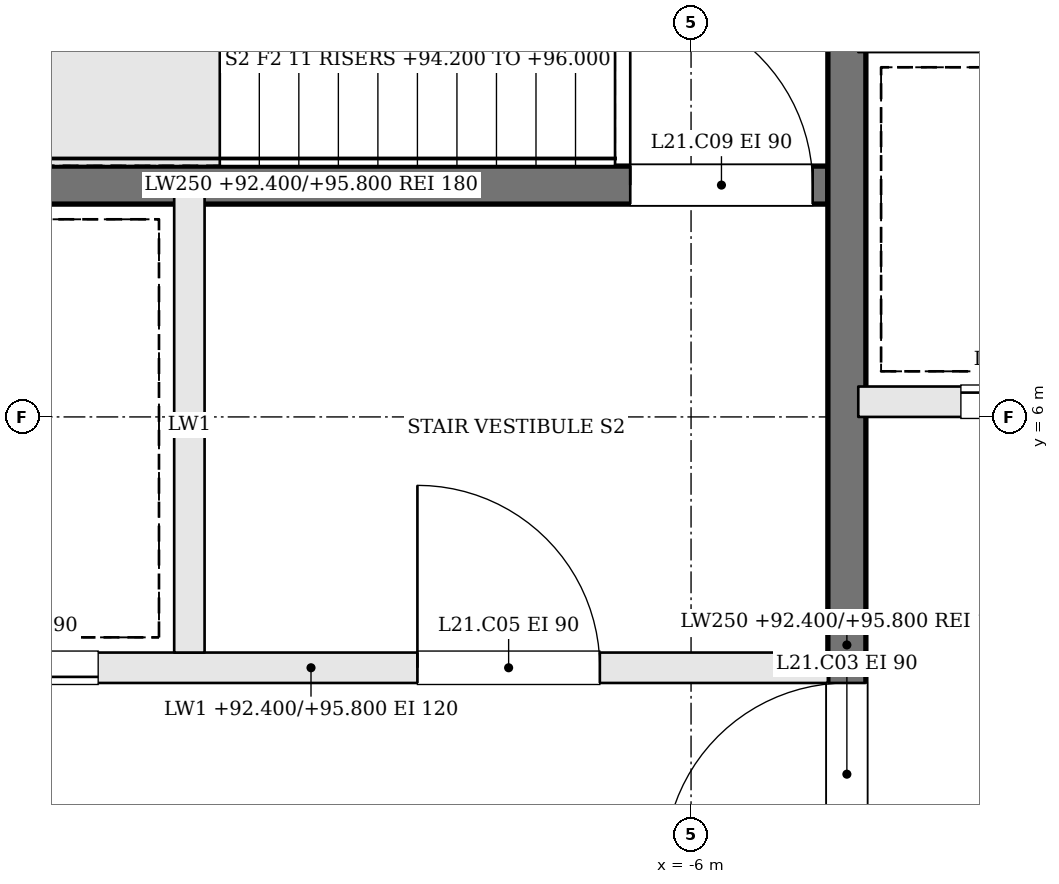
"""IFC4 building model, lengths in metres.
Left out: names, types, materials, properties, quantities, classifications, styles, units other than length and angle.
Written with IfcOpenShell. Run it as: python <this file> out.ifc"""

import sys

from ifc_helpers import new_model, si_unit, direction, frame, frame_2d, origin, place, context, subcontext, project, spatial, rectangle, extrude, element, fill, save


model = new_model("IFC4")
c1 = context("Model", 3, precision=1e-05, world=origin(), true_north=direction((0.0, 1.0)))
c2 = subcontext(c1, "Body", "Model", "MODEL_VIEW")
j1 = project(units=[si_unit("LENGTHUNIT", "METRE"), si_unit("PLANEANGLEUNIT", "RADIAN")], contexts=[c1])
p1 = place(None, origin())
s1 = spatial("IfcSite", under=j1, at=p1, CompositionType="ELEMENT")
p2 = place(p1, origin())
s2 = spatial("IfcBuilding", under=s1, at=p2, CompositionType="ELEMENT")
p3 = place(p2, frame((0.0, 0.0, 92.4)))
s3 = spatial("IfcBuildingStorey", under=s2, at=p3, CompositionType="ELEMENT", Elevation=92.4)
p4 = place(p3, frame((-11.9, 4.35, 0.0), z_axis=(0.0, 0.0, 1.0), x_axis=(1.0, 0.0, 0.0)))
e1 = element("IfcWall", 1, at=p4, inside=s3, PredefinedType="SOLIDWALL", context=c2, shape_type="SweptSolid", body=[
    extrude(rectangle(XDim=6.8, YDim=0.2, at=frame_2d((3.4, 0.0))), origin(), (0.0, 0.0, 1.0), 3.4),
])
p5 = place(p4, frame((4.1, 0.0, 0.0)))
e2 = element("IfcOpeningElement", 2, at=p5, cuts=e1, PredefinedType="OPENING", context=c2, shape_type="SweptSolid", body=[
    extrude(rectangle(XDim=1.2, YDim=2.1, at=frame_2d((0.6, 1.05))), frame((0.0, 0.11, 0.0), z_axis=(0.0, -1.0, 0.0), x_axis=(1.0, 0.0, 0.0)), (0.0, 0.0, 1.0), 0.22),
])
p6 = place(p4, frame((0.8, 0.0, 0.0)))
e3 = element("IfcOpeningElement", 3, at=p6, cuts=e1, PredefinedType="OPENING", context=c2, shape_type="SweptSolid", body=[
    extrude(rectangle(XDim=1.2, YDim=2.1, at=frame_2d((0.6, 1.05))), frame((0.0, 0.11, 0.0), z_axis=(0.0, -1.0, 0.0), x_axis=(1.0, 0.0, 0.0)), (0.0, 0.0, 1.0), 0.22),
])
p7 = place(p3, frame((-11.9, 7.525, 0.0), z_axis=(0.0, 0.0, 1.0), x_axis=(1.0, 0.0, 0.0)))
e4 = element("IfcWall", 4, at=p7, inside=s3, PredefinedType="SOLIDWALL", context=c2, shape_type="SweptSolid", body=[
    extrude(rectangle(XDim=6.8, YDim=0.25, at=frame_2d((3.4, 0.0))), origin(), (0.0, 0.0, 1.0), 3.4),
])
p8 = place(p7, frame((5.5, 0.0, 0.0)))
e5 = element("IfcOpeningElement", 5, at=p8, cuts=e4, PredefinedType="OPENING", context=c2, shape_type="SweptSolid", body=[
    extrude(rectangle(XDim=1.2, YDim=2.1, at=frame_2d((0.6, 1.05))), frame((0.0, 0.135, 0.0), z_axis=(0.0, -1.0, 0.0), x_axis=(1.0, 0.0, 0.0)), (0.0, 0.0, 1.0), 0.27),
])
p9 = place(p3, frame((-9.3, 4.45, 0.0), z_axis=(0.0, 0.0, 1.0), x_axis=(0.0, 1.0, 0.0)))
e6 = element("IfcWall", 6, at=p9, inside=s3, PredefinedType="SOLIDWALL", context=c2, shape_type="SweptSolid", body=[
    extrude(rectangle(XDim=3.0, YDim=0.2, at=frame_2d((1.5, 0.0))), origin(), (0.0, 0.0, 1.0), 3.4),
])
p10 = place(p3, frame((-4.975, -1.9, 0.0), z_axis=(0.0, 0.0, 1.0), x_axis=(0.0, 1.0, 0.0)))
e7 = element("IfcWall", 7, at=p10, inside=s3, PredefinedType="SOLIDWALL", context=c2, shape_type="SweptSolid", body=[
    extrude(rectangle(XDim=12.8, YDim=0.25, at=frame_2d((6.4, 0.0))), origin(), (0.0, 0.0, 1.0), 3.4),
])
p11 = place(p10, frame((4.95, 0.0, 0.0)))
e8 = element("IfcOpeningElement", 8, at=p11, cuts=e7, PredefinedType="OPENING", context=c2, shape_type="SweptSolid", body=[
    extrude(rectangle(XDim=1.2, YDim=2.1, at=frame_2d((0.6, 1.05))), frame((0.0, 0.135, 0.0), z_axis=(0.0, -1.0, 0.0), x_axis=(1.0, 0.0, 0.0)), (0.0, 0.0, 1.0), 0.27),
])
p12 = place(p3, frame((-4.9, 6.1, 0.0), z_axis=(0.0, 0.0, 1.0), x_axis=(1.0, 0.0, 0.0)))
e9 = element("IfcWall", 9, at=p12, inside=s3, PredefinedType="SOLIDWALL", context=c2, shape_type="SweptSolid", body=[
    extrude(rectangle(XDim=9.8, YDim=0.2, at=frame_2d((4.9, 0.0))), origin(), (0.0, 0.0, 1.0), 3.4),
])
p13 = place(p12, frame((0.675, 0.0, 0.0)))
e10 = element("IfcOpeningElement", 10, at=p13, cuts=e9, PredefinedType="OPENING", context=c2, shape_type="SweptSolid", body=[
    extrude(rectangle(XDim=1.1, YDim=2.1, at=frame_2d((0.55, 1.05))), frame((0.0, 0.11, 0.0), z_axis=(0.0, -1.0, 0.0), x_axis=(1.0, 0.0, 0.0)), (0.0, 0.0, 1.0), 0.22),
])
p14 = place(p12, frame((3.125, 0.0, 0.0)))
e11 = element("IfcOpeningElement", 11, at=p14, cuts=e9, PredefinedType="OPENING", context=c2, shape_type="SweptSolid", body=[
    extrude(rectangle(XDim=1.1, YDim=2.1, at=frame_2d((0.55, 1.05))), frame((0.0, 0.11, 0.0), z_axis=(0.0, -1.0, 0.0), x_axis=(1.0, 0.0, 0.0)), (0.0, 0.0, 1.0), 0.22),
])
p15 = place(p12, frame((5.575, 0.0, 0.0)))
e12 = element("IfcOpeningElement", 12, at=p15, cuts=e9, PredefinedType="OPENING", context=c2, shape_type="SweptSolid", body=[
    extrude(rectangle(XDim=1.1, YDim=2.1, at=frame_2d((0.55, 1.05))), frame((0.0, 0.11, 0.0), z_axis=(0.0, -1.0, 0.0), x_axis=(1.0, 0.0, 0.0)), (0.0, 0.0, 1.0), 0.22),
])
p16 = place(p12, frame((8.025, 0.0, 0.0)))
e13 = element("IfcOpeningElement", 13, at=p16, cuts=e9, PredefinedType="OPENING", context=c2, shape_type="SweptSolid", body=[
    extrude(rectangle(XDim=1.1, YDim=2.1, at=frame_2d((0.55, 1.05))), frame((0.0, 0.11, 0.0), z_axis=(0.0, -1.0, 0.0), x_axis=(1.0, 0.0, 0.0)), (0.0, 0.0, 1.0), 0.22),
])
p17 = place(p11, origin())
e14 = element("IfcDoor", 14, at=p17, inside=s3, OperationType="SINGLE_SWING_LEFT", PredefinedType="DOOR", context=c2, shape_type="SweptSolid", body=[
    extrude(rectangle(XDim=1.2, YDim=2.1, at=frame_2d((0.6, 1.05))), frame((0.0, 0.025, 0.0), z_axis=(0.0, -1.0, 0.0), x_axis=(1.0, 0.0, 0.0)), (0.0, 0.0, 1.0), 0.05),
])
fill(e8, e14)
p18 = place(p5, origin())
e15 = element("IfcDoor", 15, at=p18, inside=s3, OperationType="SINGLE_SWING_LEFT", PredefinedType="DOOR", context=c2, shape_type="SweptSolid", body=[
    extrude(rectangle(XDim=1.2, YDim=2.1, at=frame_2d((0.6, 1.05))), frame((0.0, 0.025, 0.0), z_axis=(0.0, -1.0, 0.0), x_axis=(1.0, 0.0, 0.0)), (0.0, 0.0, 1.0), 0.05),
])
fill(e2, e15)
p19 = place(p8, origin())
e16 = element("IfcDoor", 16, at=p19, inside=s3, OperationType="SINGLE_SWING_LEFT", PredefinedType="DOOR", context=c2, shape_type="SweptSolid", body=[
    extrude(rectangle(XDim=1.2, YDim=2.1, at=frame_2d((0.6, 1.05))), frame((0.0, 0.025, 0.0), z_axis=(0.0, -1.0, 0.0), x_axis=(1.0, 0.0, 0.0)), (0.0, 0.0, 1.0), 0.05),
])
fill(e5, e16)
p20 = place(p6, origin())
e17 = element("IfcDoor", 17, at=p20, inside=s3, OperationType="SLIDING_TO_RIGHT", PredefinedType="DOOR", context=c2, shape_type="SweptSolid", body=[
    extrude(rectangle(XDim=1.2, YDim=2.1, at=frame_2d((0.6, 1.05))), frame((0.0, 0.025, 0.0), z_axis=(0.0, -1.0, 0.0), x_axis=(1.0, 0.0, 0.0)), (0.0, 0.0, 1.0), 0.05),
])
fill(e3, e17)
p21 = place(p13, origin())
e18 = element("IfcDoor", 18, at=p21, inside=s3, OperationType="SLIDING_TO_RIGHT", PredefinedType="DOOR", context=c2, shape_type="SweptSolid", body=[
    extrude(rectangle(XDim=1.1, YDim=2.1, at=frame_2d((0.55, 1.05))), frame((0.0, 0.025, 0.0), z_axis=(0.0, -1.0, 0.0), x_axis=(1.0, 0.0, 0.0)), (0.0, 0.0, 1.0), 0.05),
])
fill(e10, e18)
save(model, sys.argv[1])
